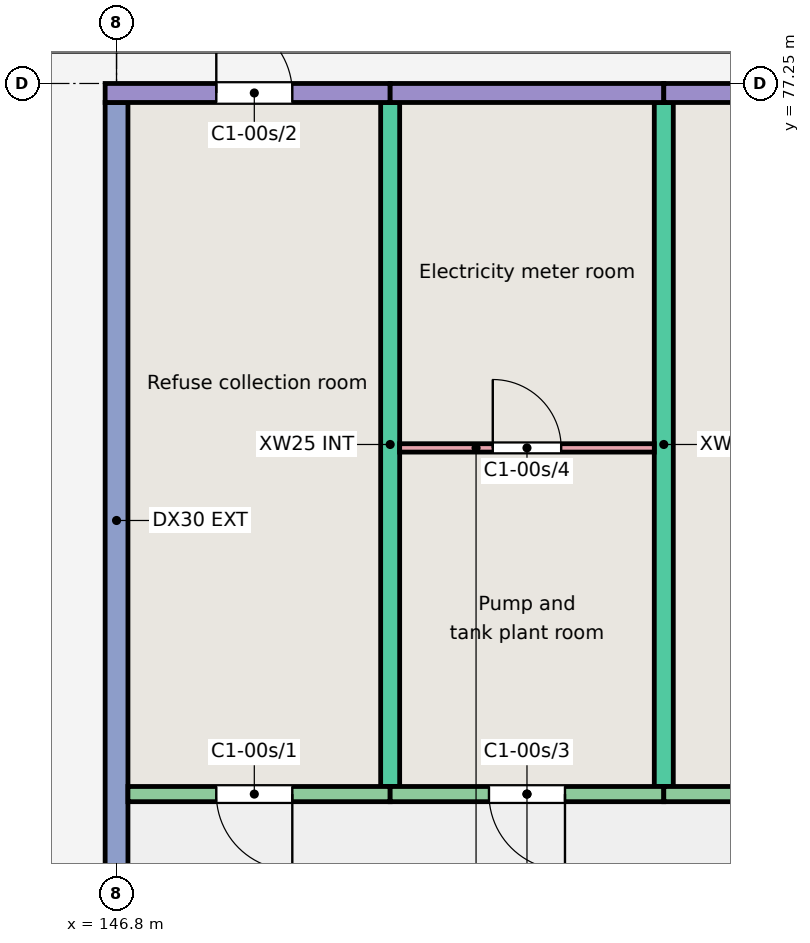
"""IFC4 building model, lengths in metres.
Left out: names, types, materials, properties, quantities, classifications, styles, units other than length and angle.
Written with IfcOpenShell. Run it as: python <this file> out.ifc"""

import sys

from ifc_helpers import new_model, si_unit, direction, frame, frame_2d, origin, place, context, subcontext, project, spatial, rectangle, extrude, element, fill, save


model = new_model("IFC4")
c1 = context("Model", 3, precision=1e-05, world=origin(), true_north=direction((0.0, 1.0)))
c2 = subcontext(c1, "Body", "Model", "MODEL_VIEW")
j1 = project(units=[si_unit("LENGTHUNIT", "METRE"), si_unit("PLANEANGLEUNIT", "RADIAN")], contexts=[c1])
p1 = place(None, origin())
s1 = spatial("IfcSite", under=j1, at=p1, CompositionType="ELEMENT")
p2 = place(p1, origin())
s2 = spatial("IfcBuilding", under=s1, at=p2, CompositionType="ELEMENT")
p3 = place(p2, origin())
s3 = spatial("IfcBuildingStorey", under=s2, at=p3, CompositionType="ELEMENT", Elevation=0.0)
p4 = place(p3, frame((146.8, 66.0, -0.25), z_axis=(0.0, 0.0, 1.0), x_axis=(0.0, 1.0, 0.0)))
e1 = element("IfcWall", 1, at=p4, inside=s3, PredefinedType="SHEAR", context=c2, shape_type="SweptSolid", body=[
    extrude(rectangle(XDim=11.0, YDim=0.3, at=frame_2d((5.5, 0.0))), origin(), (0.0, 0.0, 1.0), 3.25),
])
for number, where, z_axis, x_axis in (
    (2, (150.4, 68.0, -0.25), (0.0, 0.0, 1.0), (0.0, 1.0, 0.0)),
    (3, (154.0, 68.0, -0.25), (0.0, 0.0, 1.0), (0.0, 1.0, 0.0)),
):
    element("IfcWall", number, at=place(p3, frame(where, z_axis=z_axis, x_axis=x_axis)), inside=s3, PredefinedType="SHEAR", context=c2, shape_type="SweptSolid", body=[
        extrude(rectangle(XDim=9.0, YDim=0.25, at=frame_2d((4.5, 0.0))), origin(), (0.0, 0.0, 1.0), 3.25),
    ])
p5 = place(p3, frame((146.65, 77.125, -0.25), z_axis=(0.0, 0.0, 1.0), x_axis=(1.0, 0.0, 0.0)))
e4 = element("IfcWall", 4, at=p5, inside=s3, PredefinedType="SOLIDWALL", context=c2, shape_type="SweptSolid", body=[
    extrude(rectangle(XDim=3.75, YDim=0.25, at=frame_2d((1.875, 0.0))), origin(), (0.0, 0.0, 1.0), 3.25),
])
p6 = place(p5, frame((1.462, 0.0, 0.25)))
e5 = element("IfcOpeningElement", 5, at=p6, cuts=e4, PredefinedType="OPENING", context=c2, shape_type="SweptSolid", body=[
    extrude(rectangle(XDim=1.0, YDim=2.1, at=frame_2d((0.5, 1.05))), frame((0.0, 0.135, 0.0), z_axis=(0.0, -1.0, 0.0), x_axis=(1.0, 0.0, 0.0)), (0.0, 0.0, 1.0), 0.27),
])
p7 = place(p3, frame((146.95, 67.9, -0.25), z_axis=(0.0, 0.0, 1.0), x_axis=(1.0, 0.0, 0.0)))
e6 = element("IfcWall", 6, at=p7, inside=s3, PredefinedType="SOLIDWALL", context=c2, shape_type="SweptSolid", body=[
    extrude(rectangle(XDim=3.45, YDim=0.2, at=frame_2d((1.725, 0.0))), origin(), (0.0, 0.0, 1.0), 3.25),
])
p8 = place(p7, frame((1.163, 0.0, 0.25)))
e7 = element("IfcOpeningElement", 7, at=p8, cuts=e6, PredefinedType="OPENING", context=c2, shape_type="SweptSolid", body=[
    extrude(rectangle(XDim=1.0, YDim=2.1, at=frame_2d((0.5, 1.05))), frame((0.0, 0.11, 0.0), z_axis=(0.0, -1.0, 0.0), x_axis=(1.0, 0.0, 0.0)), (0.0, 0.0, 1.0), 0.22),
])
p9 = place(p3, frame((150.4, 77.125, -0.25), z_axis=(0.0, 0.0, 1.0), x_axis=(1.0, 0.0, 0.0)))
e8 = element("IfcWall", 8, at=p9, inside=s3, PredefinedType="SOLIDWALL", context=c2, shape_type="SweptSolid", body=[
    extrude(rectangle(XDim=3.6, YDim=0.25, at=frame_2d((1.8, 0.0))), origin(), (0.0, 0.0, 1.0), 3.25),
])
p10 = place(p3, frame((150.4, 67.9, -0.25), z_axis=(0.0, 0.0, 1.0), x_axis=(1.0, 0.0, 0.0)))
e9 = element("IfcWall", 9, at=p10, inside=s3, PredefinedType="SOLIDWALL", context=c2, shape_type="SweptSolid", body=[
    extrude(rectangle(XDim=3.6, YDim=0.2, at=frame_2d((1.8, 0.0))), origin(), (0.0, 0.0, 1.0), 3.25),
])
p11 = place(p10, frame((1.3, 0.0, 0.25)))
e10 = element("IfcOpeningElement", 10, at=p11, cuts=e9, PredefinedType="OPENING", context=c2, shape_type="SweptSolid", body=[
    extrude(rectangle(XDim=1.0, YDim=2.1, at=frame_2d((0.5, 1.05))), frame((0.0, 0.11, 0.0), z_axis=(0.0, -1.0, 0.0), x_axis=(1.0, 0.0, 0.0)), (0.0, 0.0, 1.0), 0.22),
])
p12 = place(p3, frame((154.0, 77.125, -0.25), z_axis=(0.0, 0.0, 1.0), x_axis=(1.0, 0.0, 0.0)))
e11 = element("IfcWall", 11, at=p12, inside=s3, PredefinedType="SOLIDWALL", context=c2, shape_type="SweptSolid", body=[
    extrude(rectangle(XDim=3.6, YDim=0.25, at=frame_2d((1.8, 0.0))), origin(), (0.0, 0.0, 1.0), 3.25),
])
p13 = place(p12, frame((1.3, 0.0, 0.25)))
e12 = element("IfcOpeningElement", 12, at=p13, cuts=e11, PredefinedType="OPENING", context=c2, shape_type="SweptSolid", body=[
    extrude(rectangle(XDim=1.0, YDim=2.1, at=frame_2d((0.5, 1.05))), frame((0.0, 0.135, 0.0), z_axis=(0.0, -1.0, 0.0), x_axis=(1.0, 0.0, 0.0)), (0.0, 0.0, 1.0), 0.27),
])
p14 = place(p3, frame((154.0, 67.9, -0.25), z_axis=(0.0, 0.0, 1.0), x_axis=(1.0, 0.0, 0.0)))
e13 = element("IfcWall", 13, at=p14, inside=s3, PredefinedType="SOLIDWALL", context=c2, shape_type="SweptSolid", body=[
    extrude(rectangle(XDim=3.6, YDim=0.2, at=frame_2d((1.8, 0.0))), origin(), (0.0, 0.0, 1.0), 3.25),
])
p15 = place(p14, frame((1.3, 0.0, 0.25)))
e14 = element("IfcOpeningElement", 14, at=p15, cuts=e13, PredefinedType="OPENING", context=c2, shape_type="SweptSolid", body=[
    extrude(rectangle(XDim=1.0, YDim=2.1, at=frame_2d((0.5, 1.05))), frame((0.0, 0.11, 0.0), z_axis=(0.0, -1.0, 0.0), x_axis=(1.0, 0.0, 0.0)), (0.0, 0.0, 1.0), 0.22),
])
p16 = place(p3, frame((150.525, 72.455, 0.0), z_axis=(0.0, 0.0, 1.0), x_axis=(1.0, 0.0, 0.0)))
e15 = element("IfcWall", 15, at=p16, inside=s3, PredefinedType="PARTITIONING", context=c2, shape_type="SweptSolid", body=[
    extrude(rectangle(XDim=3.35, YDim=0.11, at=frame_2d((1.675, 0.0))), origin(), (0.0, 0.0, 1.0), 2.8),
])
p17 = place(p16, frame((1.225, 0.0, 0.0)))
e16 = element("IfcOpeningElement", 16, at=p17, cuts=e15, PredefinedType="OPENING", context=c2, shape_type="SweptSolid", body=[
    extrude(rectangle(XDim=0.9, YDim=2.1, at=frame_2d((0.45, 1.05))), frame((0.0, 0.065, 0.0), z_axis=(0.0, -1.0, 0.0), x_axis=(1.0, 0.0, 0.0)), (0.0, 0.0, 1.0), 0.13),
])
p18 = place(p8, origin())
e17 = element("IfcDoor", 17, at=p18, inside=s3, OperationType="SINGLE_SWING_RIGHT", PredefinedType="DOOR", context=c2, shape_type="SweptSolid", body=[
    extrude(rectangle(XDim=1.0, YDim=2.1, at=frame_2d((0.5, 1.05))), frame((0.0, 0.025, 0.0), z_axis=(0.0, -1.0, 0.0), x_axis=(1.0, 0.0, 0.0)), (0.0, 0.0, 1.0), 0.05),
])
fill(e7, e17)
p19 = place(p6, origin())
e18 = element("IfcDoor", 18, at=p19, inside=s3, OperationType="SINGLE_SWING_LEFT", PredefinedType="DOOR", context=c2, shape_type="SweptSolid", body=[
    extrude(rectangle(XDim=1.0, YDim=2.1, at=frame_2d((0.5, 1.05))), frame((0.0, 0.025, 0.0), z_axis=(0.0, -1.0, 0.0), x_axis=(1.0, 0.0, 0.0)), (0.0, 0.0, 1.0), 0.05),
])
fill(e5, e18)
p20 = place(p11, origin())
e19 = element("IfcDoor", 19, at=p20, inside=s3, OperationType="SINGLE_SWING_RIGHT", PredefinedType="DOOR", context=c2, shape_type="SweptSolid", body=[
    extrude(rectangle(XDim=1.0, YDim=2.1, at=frame_2d((0.5, 1.05))), frame((0.0, 0.025, 0.0), z_axis=(0.0, -1.0, 0.0), x_axis=(1.0, 0.0, 0.0)), (0.0, 0.0, 1.0), 0.05),
])
fill(e10, e19)
p21 = place(p17, origin())
e20 = element("IfcDoor", 20, at=p21, inside=s3, OperationType="SINGLE_SWING_LEFT", PredefinedType="DOOR", context=c2, shape_type="SweptSolid", body=[
    extrude(rectangle(XDim=0.9, YDim=2.1, at=frame_2d((0.45, 1.05))), frame((0.0, 0.025, 0.0), z_axis=(0.0, -1.0, 0.0), x_axis=(1.0, 0.0, 0.0)), (0.0, 0.0, 1.0), 0.05),
])
fill(e16, e20)
save(model, sys.argv[1])
